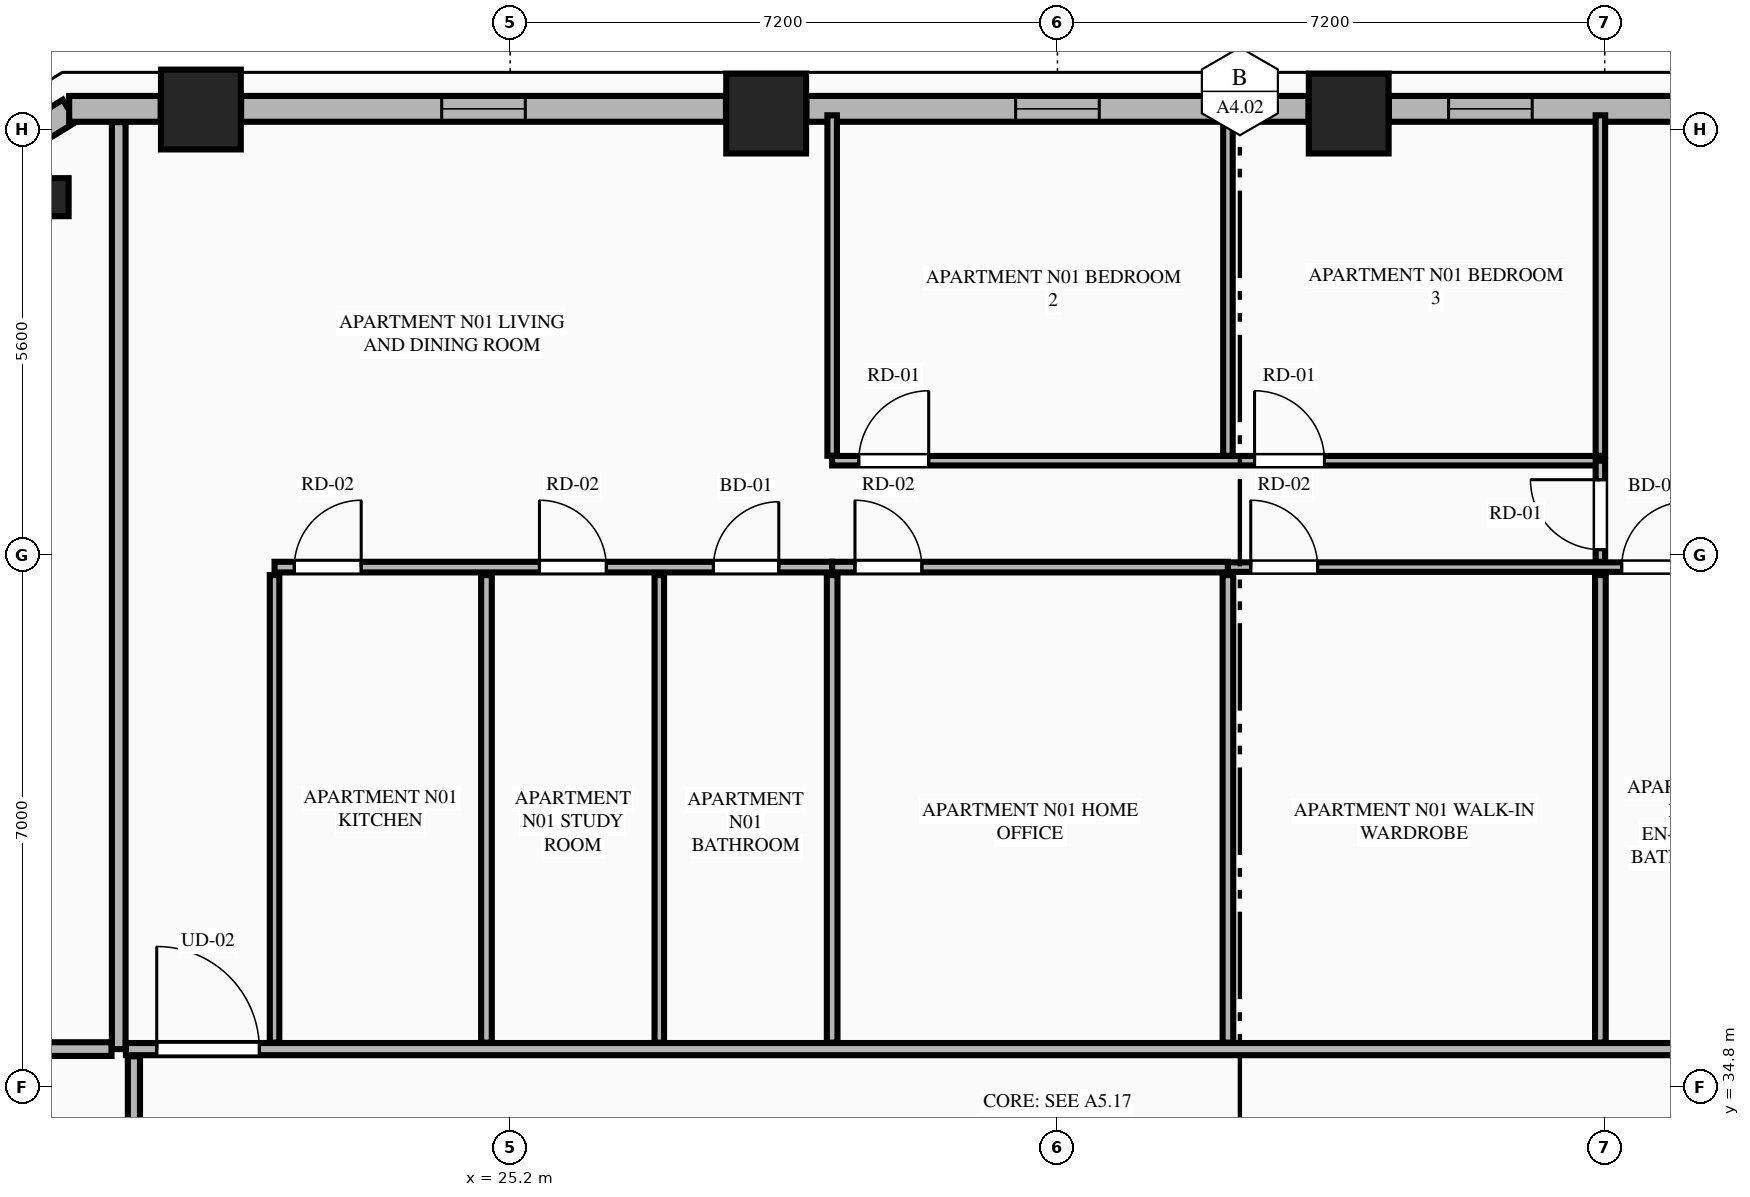
"""IFC4 building model, lengths in metres.
Left out: names, types, materials, properties, quantities, classifications, styles, units other than length and angle.
Written with IfcOpenShell. Run it as: python <this file> out.ifc"""

import sys

from ifc_helpers import new_model, si_unit, direction, frame, frame_2d, origin, origin_2d, place, context, subcontext, project, spatial, rectangle, extrude, element, fill, save


model = new_model("IFC4")
c1 = context("Model", 3, precision=1e-05, world=origin(), true_north=direction((0.0, 1.0)))
c2 = subcontext(c1, "Body", "Model", "MODEL_VIEW")
j1 = project(units=[si_unit("LENGTHUNIT", "METRE"), si_unit("PLANEANGLEUNIT", "RADIAN")], contexts=[c1])
p1 = place(None, origin())
s1 = spatial("IfcSite", under=j1, at=p1, CompositionType="ELEMENT")
p2 = place(p1, origin())
s2 = spatial("IfcBuilding", under=s1, at=p2, CompositionType="ELEMENT")
p3 = place(p2, frame((0.0, 0.0, 144.55)))
s3 = spatial("IfcBuildingStorey", under=s2, at=p3, CompositionType="ELEMENT", Elevation=144.55)
for number, where, z_axis, x_axis in (
    (1, (36.232, 47.608, 0.0), (0.0, 0.0, 1.0), (1.0, 0.0, 0.0)),
    (2, (28.568, 47.608, 0.0), (0.0, 0.0, 1.0), (1.0, 0.0, 0.0)),
    (3, (21.131, 47.661, 0.0), (0.0, 0.0, 1.0), (1.0, 0.0, 0.0)),
):
    element("IfcColumn", number, at=place(p3, frame(where, z_axis=z_axis, x_axis=x_axis)), inside=s3, PredefinedType="COLUMN", context=c2, shape_type="SweptSolid", body=[
        extrude(rectangle(XDim=1.05, YDim=1.05, at=origin_2d()), origin(), (0.0, 0.0, 1.0), 3.55),
    ])
p4 = place(p3, frame((19.141, 46.508, 0.0), z_axis=(0.0, 0.0, 1.0), x_axis=(-0.865160173452, -0.501495637342, 0.0)))
e4 = element("IfcColumn", 4, at=p4, inside=s3, PredefinedType="PILASTER", context=c2, shape_type="SweptSolid", body=[
    extrude(rectangle(XDim=0.5, YDim=0.35, at=origin_2d()), origin(), (0.0, 0.0, 1.0), 3.55),
])
p5 = place(p3, frame((19.403, 47.645, 0.0), z_axis=(0.0, 0.0, 1.0), x_axis=(-0.851798915137, -0.523868884523, 0.0)))
e5 = element("IfcWall", 5, at=p5, inside=s3, PredefinedType="STANDARD", context=c2, shape_type="SweptSolid", body=[
    extrude(rectangle(XDim=1.848, YDim=0.34, at=frame_2d((0.924, 0.0))), origin(), (0.0, 0.0, 1.0), 3.27),
])
p6 = place(p3, frame((43.14, 47.67, 0.0), z_axis=(0.0, 0.0, 1.0), x_axis=(-1.0, 0.0, 0.0)))
e6 = element("IfcWall", 6, at=p6, inside=s3, PredefinedType="STANDARD", context=c2, shape_type="SweptSolid", body=[
    extrude(rectangle(XDim=6.379, YDim=0.34, at=frame_2d((3.189, 0.0))), origin(), (0.0, 0.0, 1.0), 2.727),
])
p7 = place(p6, frame((1.192, 0.0, 0.75)))
e7 = element("IfcOpeningElement", 7, at=p7, cuts=e6, PredefinedType="OPENING", context=c2, shape_type="SweptSolid", body=[
    extrude(rectangle(XDim=1.1, YDim=1.827, at=frame_2d((0.55, 0.914))), frame((0.0, 0.18, 0.0), z_axis=(0.0, -1.0, 0.0), x_axis=(1.0, 0.0, 0.0)), (0.0, 0.0, 1.0), 0.36),
])
p8 = place(p6, frame((4.494, 0.0, 0.75)))
e8 = element("IfcOpeningElement", 8, at=p8, cuts=e6, PredefinedType="OPENING", context=c2, shape_type="SweptSolid", body=[
    extrude(rectangle(XDim=1.1, YDim=1.827, at=frame_2d((0.55, 0.914))), frame((0.0, 0.18, 0.0), z_axis=(0.0, -1.0, 0.0), x_axis=(1.0, 0.0, 0.0)), (0.0, 0.0, 1.0), 0.36),
])
p9 = place(p3, frame((35.703, 47.67, 0.0), z_axis=(0.0, 0.0, 1.0), x_axis=(-1.0, 0.0, 0.0)))
e9 = element("IfcWall", 9, at=p9, inside=s3, PredefinedType="STANDARD", context=c2, shape_type="SweptSolid", body=[
    extrude(rectangle(XDim=6.606, YDim=0.34, at=frame_2d((3.303, 0.0))), origin(), (0.0, 0.0, 1.0), 2.727),
])
p10 = place(p9, frame((2.753, 0.0, 0.75)))
e10 = element("IfcOpeningElement", 10, at=p10, cuts=e9, PredefinedType="OPENING", context=c2, shape_type="SweptSolid", body=[
    extrude(rectangle(XDim=1.1, YDim=1.827, at=frame_2d((0.55, 0.914))), frame((0.0, 0.18, 0.0), z_axis=(0.0, -1.0, 0.0), x_axis=(1.0, 0.0, 0.0)), (0.0, 0.0, 1.0), 0.36),
])
p11 = place(p3, frame((28.039, 47.67, 0.0), z_axis=(0.0, 0.0, 1.0), x_axis=(-1.0, 0.0, 0.0)))
e11 = element("IfcWall", 11, at=p11, inside=s3, PredefinedType="STANDARD", context=c2, shape_type="SweptSolid", body=[
    extrude(rectangle(XDim=6.379, YDim=0.34, at=frame_2d((3.189, 0.0))), origin(), (0.0, 0.0, 1.0), 2.727),
])
p12 = place(p11, frame((2.64, 0.0, 0.75)))
e12 = element("IfcOpeningElement", 12, at=p12, cuts=e11, PredefinedType="OPENING", context=c2, shape_type="SweptSolid", body=[
    extrude(rectangle(XDim=1.1, YDim=1.827, at=frame_2d((0.55, 0.914))), frame((0.0, 0.18, 0.0), z_axis=(0.0, -1.0, 0.0), x_axis=(1.0, 0.0, 0.0)), (0.0, 0.0, 1.0), 0.36),
])
p13 = place(p3, frame((20.602, 47.67, 0.0), z_axis=(0.0, 0.0, 1.0), x_axis=(-1.0, 0.0, 0.0)))
e13 = element("IfcWall", 13, at=p13, inside=s3, PredefinedType="STANDARD", context=c2, shape_type="SweptSolid", body=[
    extrude(rectangle(XDim=1.204, YDim=0.34, at=frame_2d((0.602, 0.0))), origin(), (0.0, 0.0, 1.0), 3.27),
])
p14 = place(p3, frame((20.05, 35.3, 0.0), z_axis=(0.0, 0.0, 1.0), x_axis=(0.0, 1.0, 0.0)))
e14 = element("IfcWall", 14, at=p14, inside=s3, PredefinedType="PARTITIONING", context=c2, shape_type="SweptSolid", body=[
    extrude(rectangle(XDim=12.195, YDim=0.18, at=frame_2d((6.098, 0.0))), origin(), (0.0, 0.0, 1.0), 3.27),
])
p15 = place(p3, frame((20.145, 35.3, 0.0), z_axis=(0.0, 0.0, 1.0), x_axis=(1.0, 0.0, 0.0)))
e15 = element("IfcWall", 15, at=p15, inside=s3, PredefinedType="PARTITIONING", context=c2, shape_type="SweptSolid", body=[
    extrude(rectangle(XDim=24.51, YDim=0.16, at=frame_2d((12.255, 0.0))), origin(), (0.0, 0.0, 1.0), 3.27),
])
p16 = place(p15, frame((0.405, 0.0, 0.0)))
e16 = element("IfcOpeningElement", 16, at=p16, cuts=e15, PredefinedType="OPENING", context=c2, shape_type="SweptSolid", body=[
    extrude(rectangle(XDim=1.35, YDim=2.35, at=frame_2d((0.675, 1.175))), frame((0.0, 0.09, 0.0), z_axis=(0.0, -1.0, 0.0), x_axis=(1.0, 0.0, 0.0)), (0.0, 0.0, 1.0), 0.18),
])
p17 = place(p3, frame((22.1, 35.385, 0.0), z_axis=(0.0, 0.0, 1.0), x_axis=(0.0, 1.0, 0.0)))
e17 = element("IfcWall", 17, at=p17, inside=s3, PredefinedType="PARTITIONING", context=c2, shape_type="SweptSolid", body=[
    extrude(rectangle(XDim=6.151, YDim=0.125, at=frame_2d((3.075, 0.0))), origin(), (0.0, 0.0, 1.0), 2.652),
])
p18 = place(p3, frame((22.1, 41.641, 0.0), z_axis=(0.0, 0.0, 1.0), x_axis=(1.0, 0.0, 0.0)))
e18 = element("IfcWall", 18, at=p18, inside=s3, PredefinedType="PLUMBINGWALL", context=c2, shape_type="SweptSolid", body=[
    extrude(rectangle(XDim=7.336, YDim=0.14, at=frame_2d((3.668, 0.0))), origin(), (0.0, 0.0, 1.0), 3.27),
])
p19 = place(p18, frame((5.774, 0.0, 0.0)))
e19 = element("IfcOpeningElement", 19, at=p19, cuts=e18, PredefinedType="OPENING", context=c2, shape_type="SweptSolid", body=[
    extrude(rectangle(XDim=0.86, YDim=2.1, at=frame_2d((0.43, 1.05))), frame((0.0, 0.08, 0.0), z_axis=(0.0, -1.0, 0.0), x_axis=(1.0, 0.0, 0.0)), (0.0, 0.0, 1.0), 0.16),
])
p20 = place(p18, frame((0.26, 0.0, 0.0)))
e20 = element("IfcOpeningElement", 20, at=p20, cuts=e18, PredefinedType="OPENING", context=c2, shape_type="SweptSolid", body=[
    extrude(rectangle(XDim=0.88, YDim=2.15, at=frame_2d((0.44, 1.075))), frame((0.0, 0.08, 0.0), z_axis=(0.0, -1.0, 0.0), x_axis=(1.0, 0.0, 0.0)), (0.0, 0.0, 1.0), 0.16),
])
p21 = place(p18, frame((3.485, 0.0, 0.0)))
e21 = element("IfcOpeningElement", 21, at=p21, cuts=e18, PredefinedType="OPENING", context=c2, shape_type="SweptSolid", body=[
    extrude(rectangle(XDim=0.88, YDim=2.15, at=frame_2d((0.44, 1.075))), frame((0.0, 0.08, 0.0), z_axis=(0.0, -1.0, 0.0), x_axis=(1.0, 0.0, 0.0)), (0.0, 0.0, 1.0), 0.16),
])
p22 = place(p3, frame((29.436, 41.641, 0.0), z_axis=(0.0, 0.0, 1.0), x_axis=(1.0, 0.0, 0.0)))
e22 = element("IfcWall", 22, at=p22, inside=s3, PredefinedType="PLUMBINGWALL", context=c2, shape_type="SweptSolid", body=[
    extrude(rectangle(XDim=5.207, YDim=0.14, at=frame_2d((2.604, 0.0))), origin(), (0.0, 0.0, 1.0), 3.27),
])
p23 = place(p22, frame((0.3, 0.0, 0.0)))
e23 = element("IfcOpeningElement", 23, at=p23, cuts=e22, PredefinedType="OPENING", context=c2, shape_type="SweptSolid", body=[
    extrude(rectangle(XDim=0.88, YDim=2.15, at=frame_2d((0.44, 1.075))), frame((0.0, 0.08, 0.0), z_axis=(0.0, -1.0, 0.0), x_axis=(1.0, 0.0, 0.0)), (0.0, 0.0, 1.0), 0.16),
])
p24 = place(p3, frame((34.643, 41.641, 0.0), z_axis=(0.0, 0.0, 1.0), x_axis=(1.0, 0.0, 0.0)))
e24 = element("IfcWall", 24, at=p24, inside=s3, PredefinedType="PARTITIONING", context=c2, shape_type="SweptSolid", body=[
    extrude(rectangle(XDim=10.012, YDim=0.125, at=frame_2d((5.006, 0.0))), origin(), (0.0, 0.0, 1.0), 3.27),
])
p25 = place(p24, frame((5.18, 0.0, 0.0)))
e25 = element("IfcOpeningElement", 25, at=p25, cuts=e24, PredefinedType="OPENING", context=c2, shape_type="SweptSolid", body=[
    extrude(rectangle(XDim=0.86, YDim=2.1, at=frame_2d((0.43, 1.05))), frame((0.0, 0.073, 0.0), z_axis=(0.0, -1.0, 0.0), x_axis=(1.0, 0.0, 0.0)), (0.0, 0.0, 1.0), 0.145),
])
p26 = place(p24, frame((7.413, 0.0, 0.0)))
e26 = element("IfcOpeningElement", 26, at=p26, cuts=e24, PredefinedType="OPENING", context=c2, shape_type="SweptSolid", body=[
    extrude(rectangle(XDim=0.88, YDim=2.15, at=frame_2d((0.44, 1.075))), frame((0.0, 0.073, 0.0), z_axis=(0.0, -1.0, 0.0), x_axis=(1.0, 0.0, 0.0)), (0.0, 0.0, 1.0), 0.145),
])
p27 = place(p24, frame((0.3, 0.0, 0.0)))
e27 = element("IfcOpeningElement", 27, at=p27, cuts=e24, PredefinedType="OPENING", context=c2, shape_type="SweptSolid", body=[
    extrude(rectangle(XDim=0.88, YDim=2.15, at=frame_2d((0.44, 1.075))), frame((0.0, 0.073, 0.0), z_axis=(0.0, -1.0, 0.0), x_axis=(1.0, 0.0, 0.0)), (0.0, 0.0, 1.0), 0.145),
])
p28 = place(p3, frame((24.888, 35.385, 0.0), z_axis=(0.0, 0.0, 1.0), x_axis=(0.0, 1.0, 0.0)))
e28 = element("IfcWall", 28, at=p28, inside=s3, PredefinedType="PLUMBINGWALL", context=c2, shape_type="SweptSolid", body=[
    extrude(rectangle(XDim=6.151, YDim=0.14, at=frame_2d((3.075, 0.0))), origin(), (0.0, 0.0, 1.0), 3.27),
])
p29 = place(p3, frame((27.162, 35.385, 0.0), z_axis=(0.0, 0.0, 1.0), x_axis=(0.0, 1.0, 0.0)))
e29 = element("IfcWall", 29, at=p29, inside=s3, PredefinedType="PARTITIONING", context=c2, shape_type="SweptSolid", body=[
    extrude(rectangle(XDim=6.151, YDim=0.125, at=frame_2d((3.075, 0.0))), origin(), (0.0, 0.0, 1.0), 3.27),
])
p30 = place(p3, frame((29.436, 43.106, 0.0), z_axis=(0.0, 0.0, 1.0), x_axis=(0.0, 1.0, 0.0)))
e30 = element("IfcWall", 30, at=p30, inside=s3, PredefinedType="PARTITIONING", context=c2, shape_type="SweptSolid", body=[
    extrude(rectangle(XDim=4.479, YDim=0.125, at=frame_2d((2.24, 0.0))), origin(), (0.0, 0.0, 1.0), 3.27),
])
p31 = place(p3, frame((29.436, 43.041, 0.0), z_axis=(0.0, 0.0, 1.0), x_axis=(1.0, 0.0, 0.0)))
e31 = element("IfcWall", 31, at=p31, inside=s3, PredefinedType="PARTITIONING", context=c2, shape_type="SweptSolid", body=[
    extrude(rectangle(XDim=10.107, YDim=0.125, at=frame_2d((5.053, 0.0))), origin(), (0.0, 0.0, 1.0), 3.27),
])
p32 = place(p31, frame((0.35, 0.0, 0.0)))
e32 = element("IfcOpeningElement", 32, at=p32, cuts=e31, PredefinedType="OPENING", context=c2, shape_type="SweptSolid", body=[
    extrude(rectangle(XDim=0.92, YDim=2.15, at=frame_2d((0.46, 1.075))), frame((0.0, 0.073, 0.0), z_axis=(0.0, -1.0, 0.0), x_axis=(1.0, 0.0, 0.0)), (0.0, 0.0, 1.0), 0.145),
])
p33 = place(p31, frame((5.557, 0.0, 0.0)))
e33 = element("IfcOpeningElement", 33, at=p33, cuts=e31, PredefinedType="OPENING", context=c2, shape_type="SweptSolid", body=[
    extrude(rectangle(XDim=0.92, YDim=2.15, at=frame_2d((0.46, 1.075))), frame((0.0, 0.073, 0.0), z_axis=(0.0, -1.0, 0.0), x_axis=(1.0, 0.0, 0.0)), (0.0, 0.0, 1.0), 0.145),
])
p34 = place(p3, frame((39.543, 41.711, 0.0), z_axis=(0.0, 0.0, 1.0), x_axis=(0.0, 1.0, 0.0)))
e34 = element("IfcWall", 34, at=p34, inside=s3, PredefinedType="PARTITIONING", context=c2, shape_type="SweptSolid", body=[
    extrude(rectangle(XDim=1.33, YDim=0.125, at=frame_2d((0.665, 0.0))), origin(), (0.0, 0.0, 1.0), 3.27),
])
p35 = place(p34, frame((0.16, 0.0, 0.0)))
e35 = element("IfcOpeningElement", 35, at=p35, cuts=e34, PredefinedType="OPENING", context=c2, shape_type="SweptSolid", body=[
    extrude(rectangle(XDim=0.92, YDim=2.15, at=frame_2d((0.46, 1.075))), frame((0.0, 0.073, 0.0), z_axis=(0.0, -1.0, 0.0), x_axis=(1.0, 0.0, 0.0)), (0.0, 0.0, 1.0), 0.145),
])
for number, where, z_axis, x_axis in (
    (36, (29.436, 35.385, 0.0), (0.0, 0.0, 1.0), (0.0, 1.0, 0.0)),
    (37, (34.643, 35.385, 0.0), (0.0, 0.0, 1.0), (0.0, 1.0, 0.0)),
):
    element("IfcWall", number, at=place(p3, frame(where, z_axis=z_axis, x_axis=x_axis)), inside=s3, PredefinedType="PLUMBINGWALL", context=c2, shape_type="SweptSolid", body=[
        extrude(rectangle(XDim=6.151, YDim=0.14, at=frame_2d((3.075, 0.0))), origin(), (0.0, 0.0, 1.0), 3.27),
    ])
for number, where, z_axis, x_axis in (
    (38, (34.643, 43.106, 0.0), (0.0, 0.0, 1.0), (0.0, 1.0, 0.0)),
    (39, (39.543, 43.106, 0.0), (0.0, 0.0, 1.0), (0.0, 1.0, 0.0)),
):
    element("IfcWall", number, at=place(p3, frame(where, z_axis=z_axis, x_axis=x_axis)), inside=s3, PredefinedType="PARTITIONING", context=c2, shape_type="SweptSolid", body=[
        extrude(rectangle(XDim=4.479, YDim=0.125, at=frame_2d((2.24, 0.0))), origin(), (0.0, 0.0, 1.0), 3.27),
    ])
p36 = place(p3, frame((39.543, 35.385, 0.0), z_axis=(0.0, 0.0, 1.0), x_axis=(0.0, 1.0, 0.0)))
e40 = element("IfcWall", 40, at=p36, inside=s3, PredefinedType="PLUMBINGWALL", context=c2, shape_type="SweptSolid", body=[
    extrude(rectangle(XDim=6.151, YDim=0.14, at=frame_2d((3.075, 0.0))), origin(), (0.0, 0.0, 1.0), 3.27),
])
p37 = place(p3, frame((12.286, 35.3, 0.0), z_axis=(0.0, 0.0, 1.0), x_axis=(1.0, 0.0, 0.0)))
e41 = element("IfcWall", 41, at=p37, inside=s3, PredefinedType="PARTITIONING", context=c2, shape_type="SweptSolid", body=[
    extrude(rectangle(XDim=7.669, YDim=0.18, at=frame_2d((3.834, 0.0))), origin(), (0.0, 0.0, 1.0), 3.27),
])
p38 = place(p3, frame((20.25, 24.491, 0.0), z_axis=(0.0, 0.0, 1.0), x_axis=(0.0, 1.0, 0.0)))
e42 = element("IfcWall", 42, at=p38, inside=s3, PredefinedType="PARTITIONING", context=c2, shape_type="SweptSolid", body=[
    extrude(rectangle(XDim=10.714, YDim=0.16, at=frame_2d((5.357, 0.0))), origin(), (0.0, 0.0, 1.0), 3.27),
])
p39 = place(p38, frame((0.4, 0.0, 0.0)))
e43 = element("IfcOpeningElement", 43, at=p39, cuts=e42, PredefinedType="OPENING", context=c2, shape_type="SweptSolid", body=[
    extrude(rectangle(XDim=1.02, YDim=2.25, at=frame_2d((0.51, 1.125))), frame((0.0, 0.09, 0.0), z_axis=(0.0, -1.0, 0.0), x_axis=(1.0, 0.0, 0.0)), (0.0, 0.0, 1.0), 0.18),
])
p40 = place(p10, origin())
e44 = element("IfcWindow", 44, at=p40, inside=s3, PartitioningType="SINGLE_PANEL", PredefinedType="WINDOW", context=c2, shape_type="SweptSolid", body=[
    extrude(rectangle(XDim=1.1, YDim=1.827, at=frame_2d((0.55, 0.914))), frame((0.0, 0.03, 0.0), z_axis=(0.0, -1.0, 0.0), x_axis=(1.0, 0.0, 0.0)), (0.0, 0.0, 1.0), 0.06),
])
fill(e10, e44)
p41 = place(p12, origin())
e45 = element("IfcWindow", 45, at=p41, inside=s3, PartitioningType="SINGLE_PANEL", PredefinedType="WINDOW", context=c2, shape_type="SweptSolid", body=[
    extrude(rectangle(XDim=1.1, YDim=1.827, at=frame_2d((0.55, 0.914))), frame((0.0, 0.03, 0.0), z_axis=(0.0, -1.0, 0.0), x_axis=(1.0, 0.0, 0.0)), (0.0, 0.0, 1.0), 0.06),
])
fill(e12, e45)
p42 = place(p19, origin())
e46 = element("IfcDoor", 46, at=p42, inside=s3, OperationType="SINGLE_SWING_RIGHT", PredefinedType="DOOR", context=c2, shape_type="SweptSolid", body=[
    extrude(rectangle(XDim=0.86, YDim=2.1, at=frame_2d((0.43, 1.05))), frame((0.0, 0.025, 0.0), z_axis=(0.0, -1.0, 0.0), x_axis=(1.0, 0.0, 0.0)), (0.0, 0.0, 1.0), 0.05),
])
fill(e19, e46)
p43 = place(p25, origin())
e47 = element("IfcDoor", 47, at=p43, inside=s3, OperationType="SINGLE_SWING_RIGHT", PredefinedType="DOOR", context=c2, shape_type="SweptSolid", body=[
    extrude(rectangle(XDim=0.86, YDim=2.1, at=frame_2d((0.43, 1.05))), frame((0.0, 0.025, 0.0), z_axis=(0.0, -1.0, 0.0), x_axis=(1.0, 0.0, 0.0)), (0.0, 0.0, 1.0), 0.05),
])
fill(e25, e47)
p44 = place(p16, origin())
e48 = element("IfcDoor", 48, at=p44, inside=s3, OperationType="SINGLE_SWING_LEFT", PredefinedType="DOOR", context=c2, shape_type="SweptSolid", body=[
    extrude(rectangle(XDim=1.35, YDim=2.35, at=frame_2d((0.675, 1.175))), frame((0.0, 0.025, 0.0), z_axis=(0.0, -1.0, 0.0), x_axis=(1.0, 0.0, 0.0)), (0.0, 0.0, 1.0), 0.05),
])
fill(e16, e48)
p45 = place(p20, origin())
e49 = element("IfcDoor", 49, at=p45, inside=s3, OperationType="SINGLE_SWING_RIGHT", PredefinedType="DOOR", context=c2, shape_type="SweptSolid", body=[
    extrude(rectangle(XDim=0.88, YDim=2.15, at=frame_2d((0.44, 1.075))), frame((0.0, 0.025, 0.0), z_axis=(0.0, -1.0, 0.0), x_axis=(1.0, 0.0, 0.0)), (0.0, 0.0, 1.0), 0.05),
])
fill(e20, e49)
p46 = place(p21, origin())
e50 = element("IfcDoor", 50, at=p46, inside=s3, OperationType="SINGLE_SWING_LEFT", PredefinedType="DOOR", context=c2, shape_type="SweptSolid", body=[
    extrude(rectangle(XDim=0.88, YDim=2.15, at=frame_2d((0.44, 1.075))), frame((0.0, 0.025, 0.0), z_axis=(0.0, -1.0, 0.0), x_axis=(1.0, 0.0, 0.0)), (0.0, 0.0, 1.0), 0.05),
])
fill(e21, e50)
p47 = place(p23, origin())
e51 = element("IfcDoor", 51, at=p47, inside=s3, OperationType="SINGLE_SWING_LEFT", PredefinedType="DOOR", context=c2, shape_type="SweptSolid", body=[
    extrude(rectangle(XDim=0.88, YDim=2.15, at=frame_2d((0.44, 1.075))), frame((0.0, 0.025, 0.0), z_axis=(0.0, -1.0, 0.0), x_axis=(1.0, 0.0, 0.0)), (0.0, 0.0, 1.0), 0.05),
])
fill(e23, e51)
p48 = place(p32, origin())
e52 = element("IfcDoor", 52, at=p48, inside=s3, OperationType="SINGLE_SWING_RIGHT", PredefinedType="DOOR", context=c2, shape_type="SweptSolid", body=[
    extrude(rectangle(XDim=0.92, YDim=2.15, at=frame_2d((0.46, 1.075))), frame((0.0, 0.025, 0.0), z_axis=(0.0, -1.0, 0.0), x_axis=(1.0, 0.0, 0.0)), (0.0, 0.0, 1.0), 0.05),
])
fill(e32, e52)
p49 = place(p33, origin())
e53 = element("IfcDoor", 53, at=p49, inside=s3, OperationType="SINGLE_SWING_LEFT", PredefinedType="DOOR", context=c2, shape_type="SweptSolid", body=[
    extrude(rectangle(XDim=0.92, YDim=2.15, at=frame_2d((0.46, 1.075))), frame((0.0, 0.025, 0.0), z_axis=(0.0, -1.0, 0.0), x_axis=(1.0, 0.0, 0.0)), (0.0, 0.0, 1.0), 0.05),
])
fill(e33, e53)
p50 = place(p35, origin())
e54 = element("IfcDoor", 54, at=p50, inside=s3, OperationType="SINGLE_SWING_RIGHT", PredefinedType="DOOR", context=c2, shape_type="SweptSolid", body=[
    extrude(rectangle(XDim=0.92, YDim=2.15, at=frame_2d((0.46, 1.075))), frame((0.0, 0.025, 0.0), z_axis=(0.0, -1.0, 0.0), x_axis=(1.0, 0.0, 0.0)), (0.0, 0.0, 1.0), 0.05),
])
fill(e35, e54)
p51 = place(p27, origin())
e55 = element("IfcDoor", 55, at=p51, inside=s3, OperationType="SINGLE_SWING_LEFT", PredefinedType="DOOR", context=c2, shape_type="SweptSolid", body=[
    extrude(rectangle(XDim=0.88, YDim=2.15, at=frame_2d((0.44, 1.075))), frame((0.0, 0.025, 0.0), z_axis=(0.0, -1.0, 0.0), x_axis=(1.0, 0.0, 0.0)), (0.0, 0.0, 1.0), 0.05),
])
fill(e27, e55)
p52 = place(p8, origin())
e56 = element("IfcWindow", 56, at=p52, inside=s3, PartitioningType="SINGLE_PANEL", PredefinedType="WINDOW", context=c2, shape_type="SweptSolid", body=[
    extrude(rectangle(XDim=1.1, YDim=1.827, at=frame_2d((0.55, 0.914))), frame((0.0, 0.03, 0.0), z_axis=(0.0, -1.0, 0.0), x_axis=(1.0, 0.0, 0.0)), (0.0, 0.0, 1.0), 0.06),
])
fill(e8, e56)
save(model, sys.argv[1])
